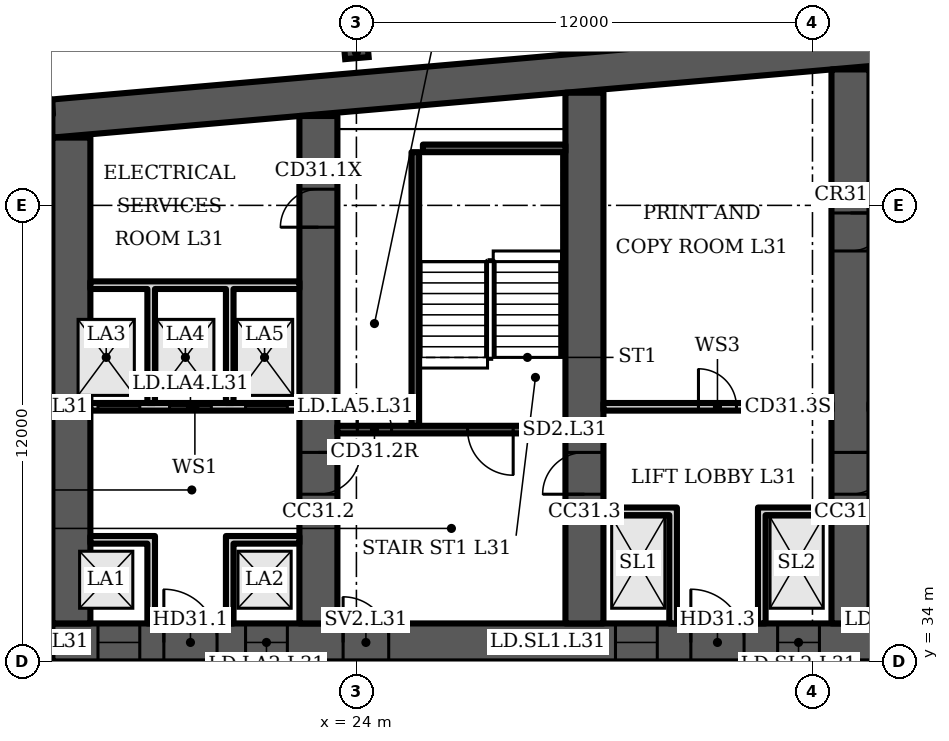
"""IFC4 building model, lengths in metres.
Left out: names, types, materials, properties, quantities, classifications, styles, units other than length and angle.
Written with IfcOpenShell. Run it as: python <this file> out.ifc"""

import sys

from ifc_helpers import new_model, si_unit, direction, frame, frame_2d, origin, origin_2d, place, context, subcontext, project, spatial, polyline, rectangle, i_section, outline, extrude, element, fill, save


model = new_model("IFC4")
c1 = context("Model", 3, precision=1e-05, world=origin(), true_north=direction((0.0, 1.0)))
c2 = subcontext(c1, "Body", "Model", "MODEL_VIEW")
j1 = project(units=[si_unit("LENGTHUNIT", "METRE"), si_unit("PLANEANGLEUNIT", "RADIAN")], contexts=[c1])
p1 = place(None, origin())
s1 = spatial("IfcSite", under=j1, at=p1, CompositionType="ELEMENT")
p2 = place(p1, origin())
s2 = spatial("IfcBuilding", under=s1, at=p2, CompositionType="ELEMENT")
p3 = place(p2, frame((0.0, 0.0, 132.7)))
s3 = spatial("IfcBuildingStorey", under=s2, at=p3, CompositionType="ELEMENT", Elevation=132.7)
p4 = place(p3, origin())
e1 = element("IfcWall", 1, at=p4, inside=s3, PredefinedType="SHEAR", context=c2, shape_type="SweptSolid", body=[
    extrude(outline(polyline([(16.0, 47.784), (40.5, 49.927), (65.0, 47.784), (65.0, 48.787), (40.5, 50.931), (16.0, 48.787), (16.0, 47.784)])), origin(), (0.0, 0.0, 1.0), 3.6),
])
p5 = place(p3, frame((16.0, 34.5, 0.0), z_axis=(0.0, 0.0, 1.0), x_axis=(1.0, 0.0, 0.0)))
e2 = element("IfcWall", 2, at=p5, inside=s3, PredefinedType="SHEAR", context=c2, shape_type="SweptSolid", body=[
    extrude(rectangle(XDim=49.0, YDim=1.0, at=frame_2d((24.5, 0.0))), origin(), (0.0, 0.0, 1.0), 3.6),
])
p6 = place(p5, frame((1.2, 0.0, 0.0)))
e3 = element("IfcOpeningElement", 3, at=p6, cuts=e2, PredefinedType="OPENING", context=c2, shape_type="SweptSolid", body=[
    extrude(rectangle(XDim=1.1, YDim=2.1, at=frame_2d((0.55, 1.05))), frame((0.0, 0.51, 0.0), z_axis=(0.0, -1.0, 0.0), x_axis=(1.0, 0.0, 0.0)), (0.0, 0.0, 1.0), 1.02),
])
p7 = place(p5, frame((5.083, 0.0, 0.0)))
e4 = element("IfcOpeningElement", 4, at=p7, cuts=e2, PredefinedType="OPENING", context=c2, shape_type="SweptSolid", body=[
    extrude(rectangle(XDim=1.1, YDim=2.1, at=frame_2d((0.55, 1.05))), frame((0.0, 0.51, 0.0), z_axis=(0.0, -1.0, 0.0), x_axis=(1.0, 0.0, 0.0)), (0.0, 0.0, 1.0), 1.02),
])
p8 = place(p5, frame((2.933, 0.0, 0.0)))
e5 = element("IfcOpeningElement", 5, at=p8, cuts=e2, PredefinedType="OPENING", context=c2, shape_type="SweptSolid", body=[
    extrude(rectangle(XDim=1.4, YDim=2.1, at=frame_2d((0.7, 1.05))), frame((0.0, 0.51, 0.0), z_axis=(0.0, -1.0, 0.0), x_axis=(1.0, 0.0, 0.0)), (0.0, 0.0, 1.0), 1.02),
])
p9 = place(p5, frame((7.65, 0.0, 0.0)))
e6 = element("IfcOpeningElement", 6, at=p9, cuts=e2, PredefinedType="OPENING", context=c2, shape_type="SweptSolid", body=[
    extrude(rectangle(XDim=1.2, YDim=2.1, at=frame_2d((0.6, 1.05))), frame((0.0, 0.51, 0.0), z_axis=(0.0, -1.0, 0.0), x_axis=(1.0, 0.0, 0.0)), (0.0, 0.0, 1.0), 1.02),
])
p10 = place(p5, frame((14.817, 0.0, 0.0)))
e7 = element("IfcOpeningElement", 7, at=p10, cuts=e2, PredefinedType="OPENING", context=c2, shape_type="SweptSolid", body=[
    extrude(rectangle(XDim=1.1, YDim=2.1, at=frame_2d((0.55, 1.05))), frame((0.0, 0.51, 0.0), z_axis=(0.0, -1.0, 0.0), x_axis=(1.0, 0.0, 0.0)), (0.0, 0.0, 1.0), 1.02),
])
p11 = place(p5, frame((19.083, 0.0, 0.0)))
e8 = element("IfcOpeningElement", 8, at=p11, cuts=e2, PredefinedType="OPENING", context=c2, shape_type="SweptSolid", body=[
    extrude(rectangle(XDim=1.1, YDim=2.1, at=frame_2d((0.55, 1.05))), frame((0.0, 0.51, 0.0), z_axis=(0.0, -1.0, 0.0), x_axis=(1.0, 0.0, 0.0)), (0.0, 0.0, 1.0), 1.02),
])
p12 = place(p5, frame((16.8, 0.0, 0.0)))
e9 = element("IfcOpeningElement", 9, at=p12, cuts=e2, PredefinedType="OPENING", context=c2, shape_type="SweptSolid", body=[
    extrude(rectangle(XDim=1.4, YDim=2.1, at=frame_2d((0.7, 1.05))), frame((0.0, 0.51, 0.0), z_axis=(0.0, -1.0, 0.0), x_axis=(1.0, 0.0, 0.0)), (0.0, 0.0, 1.0), 1.02),
])
p13 = place(p5, frame((21.817, 0.0, 0.0)))
e10 = element("IfcOpeningElement", 10, at=p13, cuts=e2, PredefinedType="OPENING", context=c2, shape_type="SweptSolid", body=[
    extrude(rectangle(XDim=1.1, YDim=2.1, at=frame_2d((0.55, 1.05))), frame((0.0, 0.51, 0.0), z_axis=(0.0, -1.0, 0.0), x_axis=(1.0, 0.0, 0.0)), (0.0, 0.0, 1.0), 1.02),
])
p14 = place(p5, frame((26.083, 0.0, 0.0)))
e11 = element("IfcOpeningElement", 11, at=p14, cuts=e2, PredefinedType="OPENING", context=c2, shape_type="SweptSolid", body=[
    extrude(rectangle(XDim=1.1, YDim=2.1, at=frame_2d((0.55, 1.05))), frame((0.0, 0.51, 0.0), z_axis=(0.0, -1.0, 0.0), x_axis=(1.0, 0.0, 0.0)), (0.0, 0.0, 1.0), 1.02),
])
p15 = place(p5, frame((33.15, 0.0, 0.0)))
e12 = element("IfcOpeningElement", 12, at=p15, cuts=e2, PredefinedType="OPENING", context=c2, shape_type="SweptSolid", body=[
    extrude(rectangle(XDim=1.2, YDim=2.1, at=frame_2d((0.6, 1.05))), frame((0.0, 0.51, 0.0), z_axis=(0.0, -1.0, 0.0), x_axis=(1.0, 0.0, 0.0)), (0.0, 0.0, 1.0), 1.02),
])
p16 = place(p5, frame((37.8, 0.0, 0.0)))
e13 = element("IfcOpeningElement", 13, at=p16, cuts=e2, PredefinedType="OPENING", context=c2, shape_type="SweptSolid", body=[
    extrude(rectangle(XDim=1.4, YDim=2.1, at=frame_2d((0.7, 1.05))), frame((0.0, 0.51, 0.0), z_axis=(0.0, -1.0, 0.0), x_axis=(1.0, 0.0, 0.0)), (0.0, 0.0, 1.0), 1.02),
])
p17 = place(p5, frame((42.817, 0.0, 0.0)))
e14 = element("IfcOpeningElement", 14, at=p17, cuts=e2, PredefinedType="OPENING", context=c2, shape_type="SweptSolid", body=[
    extrude(rectangle(XDim=1.1, YDim=2.1, at=frame_2d((0.55, 1.05))), frame((0.0, 0.51, 0.0), z_axis=(0.0, -1.0, 0.0), x_axis=(1.0, 0.0, 0.0)), (0.0, 0.0, 1.0), 1.02),
])
p18 = place(p5, frame((46.7, 0.0, 0.0)))
e15 = element("IfcOpeningElement", 15, at=p18, cuts=e2, PredefinedType="OPENING", context=c2, shape_type="SweptSolid", body=[
    extrude(rectangle(XDim=1.1, YDim=2.1, at=frame_2d((0.55, 1.05))), frame((0.0, 0.51, 0.0), z_axis=(0.0, -1.0, 0.0), x_axis=(1.0, 0.0, 0.0)), (0.0, 0.0, 1.0), 1.02),
])
p19 = place(p5, frame((44.667, 0.0, 0.0)))
e16 = element("IfcOpeningElement", 16, at=p19, cuts=e2, PredefinedType="OPENING", context=c2, shape_type="SweptSolid", body=[
    extrude(rectangle(XDim=1.4, YDim=2.1, at=frame_2d((0.7, 1.05))), frame((0.0, 0.51, 0.0), z_axis=(0.0, -1.0, 0.0), x_axis=(1.0, 0.0, 0.0)), (0.0, 0.0, 1.0), 1.02),
])
p20 = place(p3, frame((16.5, 35.0, 0.0), z_axis=(0.0, 0.0, 1.0), x_axis=(0.0, 1.0, 0.0)))
e17 = element("IfcWall", 17, at=p20, inside=s3, PredefinedType="SHEAR", context=c2, shape_type="SweptSolid", body=[
    extrude(rectangle(XDim=12.784, YDim=1.0, at=frame_2d((6.392, 0.0))), origin(), (0.0, 0.0, 1.0), 3.6),
])
p21 = place(p3, frame((23.0, 35.0, 0.0), z_axis=(0.0, 0.0, 1.0), x_axis=(0.0, 1.0, 0.0)))
e18 = element("IfcWall", 18, at=p21, inside=s3, PredefinedType="SHEAR", context=c2, shape_type="SweptSolid", body=[
    extrude(rectangle(XDim=13.352, YDim=1.0, at=frame_2d((6.676, 0.0))), origin(), (0.0, 0.0, 1.0), 3.6),
])
p22 = place(p21, frame((10.426, 0.0, 0.0)))
e19 = element("IfcOpeningElement", 19, at=p22, cuts=e18, PredefinedType="OPENING", context=c2, shape_type="SweptSolid", body=[
    extrude(rectangle(XDim=1.0, YDim=2.1, at=frame_2d((0.5, 1.05))), frame((0.0, 0.51, 0.0), z_axis=(0.0, -1.0, 0.0), x_axis=(1.0, 0.0, 0.0)), (0.0, 0.0, 1.0), 1.02),
])
p23 = place(p21, frame((3.4, 0.0, 0.0)))
e20 = element("IfcOpeningElement", 20, at=p23, cuts=e18, PredefinedType="OPENING", context=c2, shape_type="SweptSolid", body=[
    extrude(rectangle(XDim=1.1, YDim=2.1, at=frame_2d((0.55, 1.05))), frame((0.0, 0.51, 0.0), z_axis=(0.0, -1.0, 0.0), x_axis=(1.0, 0.0, 0.0)), (0.0, 0.0, 1.0), 1.02),
])
p24 = place(p3, frame((30.0, 35.0, 0.0), z_axis=(0.0, 0.0, 1.0), x_axis=(0.0, 1.0, 0.0)))
e21 = element("IfcWall", 21, at=p24, inside=s3, PredefinedType="SHEAR", context=c2, shape_type="SweptSolid", body=[
    extrude(rectangle(XDim=13.965, YDim=1.0, at=frame_2d((6.982, 0.0))), origin(), (0.0, 0.0, 1.0), 3.6),
])
p25 = place(p24, frame((3.4, 0.0, 0.0)))
e22 = element("IfcOpeningElement", 22, at=p25, cuts=e21, PredefinedType="OPENING", context=c2, shape_type="SweptSolid", body=[
    extrude(rectangle(XDim=1.1, YDim=2.1, at=frame_2d((0.55, 1.05))), frame((0.0, 0.51, 0.0), z_axis=(0.0, -1.0, 0.0), x_axis=(1.0, 0.0, 0.0)), (0.0, 0.0, 1.0), 1.02),
])
p26 = place(p3, frame((37.0, 35.0, 0.0), z_axis=(0.0, 0.0, 1.0), x_axis=(0.0, 1.0, 0.0)))
e23 = element("IfcWall", 23, at=p26, inside=s3, PredefinedType="SHEAR", context=c2, shape_type="SweptSolid", body=[
    extrude(rectangle(XDim=14.577, YDim=1.0, at=frame_2d((7.289, 0.0))), origin(), (0.0, 0.0, 1.0), 3.6),
])
p27 = place(p26, frame((3.4, 0.0, 0.0)))
e24 = element("IfcOpeningElement", 24, at=p27, cuts=e23, PredefinedType="OPENING", context=c2, shape_type="SweptSolid", body=[
    extrude(rectangle(XDim=1.1, YDim=2.1, at=frame_2d((0.55, 1.05))), frame((0.0, 0.51, 0.0), z_axis=(0.0, -1.0, 0.0), x_axis=(1.0, 0.0, 0.0)), (0.0, 0.0, 1.0), 1.02),
])
p28 = place(p26, frame((9.8, 0.0, 0.0)))
e25 = element("IfcOpeningElement", 25, at=p28, cuts=e23, PredefinedType="OPENING", context=c2, shape_type="SweptSolid", body=[
    extrude(rectangle(XDim=1.0, YDim=2.1, at=frame_2d((0.5, 1.05))), frame((0.0, 0.51, 0.0), z_axis=(0.0, -1.0, 0.0), x_axis=(1.0, 0.0, 0.0)), (0.0, 0.0, 1.0), 1.02),
])
p29 = place(p3, frame((24.0, 50.027, 0.0), z_axis=(0.0, 0.0, 1.0), x_axis=(-0.087156, 0.996198, 0.0)))
e26 = element("IfcColumn", 26, at=p29, inside=s3, PredefinedType="COLUMN", context=c2, shape_type="SweptSolid", body=[
    extrude(i_section(OverallWidth=0.305, OverallDepth=0.62, WebThickness=0.021, FlangeThickness=0.04, FilletRadius=0.027, at=origin_2d()), origin(), (0.0, 0.0, 1.0), 3.6),
])
p30 = place(p3, frame((16.0, 48.587, 0.0), z_axis=(0.0, 0.0, 1.0), x_axis=(-0.996194, -0.087168, 0.0)))
e27 = element("IfcWall", 27, at=p30, inside=s3, PredefinedType="SOLIDWALL", context=c2, shape_type="SweptSolid", body=[
    extrude(rectangle(XDim=2.994, YDim=0.4, at=frame_2d((1.497, 0.0))), origin(), (0.0, 0.0, 1.0), 3.2),
])
p31 = place(p3, frame((17.0, 40.7, 0.0), z_axis=(0.0, 0.0, 1.0), x_axis=(1.0, 0.0, 0.0)))
e28 = element("IfcWall", 28, at=p31, inside=s3, PredefinedType="PARTITIONING", context=c2, shape_type="SweptSolid", body=[
    extrude(rectangle(XDim=5.5, YDim=0.2, at=frame_2d((2.75, 0.0))), origin(), (0.0, 0.0, 1.0), 3.2),
])
p32 = place(p31, frame((0.2, 0.0, 0.0)))
e29 = element("IfcOpeningElement", 29, at=p32, cuts=e28, PredefinedType="OPENING", context=c2, shape_type="SweptSolid", body=[
    extrude(rectangle(XDim=1.1, YDim=2.1, at=frame_2d((0.55, 1.05))), frame((0.0, 0.11, 0.0), z_axis=(0.0, -1.0, 0.0), x_axis=(1.0, 0.0, 0.0)), (0.0, 0.0, 1.0), 0.22),
])
p33 = place(p31, frame((2.083, 0.0, 0.0)))
e30 = element("IfcOpeningElement", 30, at=p33, cuts=e28, PredefinedType="OPENING", context=c2, shape_type="SweptSolid", body=[
    extrude(rectangle(XDim=1.1, YDim=2.1, at=frame_2d((0.55, 1.05))), frame((0.0, 0.11, 0.0), z_axis=(0.0, -1.0, 0.0), x_axis=(1.0, 0.0, 0.0)), (0.0, 0.0, 1.0), 0.22),
])
p34 = place(p31, frame((4.083, 0.0, 0.0)))
e31 = element("IfcOpeningElement", 31, at=p34, cuts=e28, PredefinedType="OPENING", context=c2, shape_type="SweptSolid", body=[
    extrude(rectangle(XDim=1.1, YDim=2.1, at=frame_2d((0.55, 1.05))), frame((0.0, 0.11, 0.0), z_axis=(0.0, -1.0, 0.0), x_axis=(1.0, 0.0, 0.0)), (0.0, 0.0, 1.0), 0.22),
])
p35 = place(p3, frame((0.0, 0.0, -0.0)))
e32 = element("IfcWall", 32, at=p35, inside=s3, PredefinedType="PARTITIONING", context=c2, shape_type="SweptSolid", body=[
    extrude(outline(polyline([(18.5, 37.1), (17.0, 37.1), (17.0, 37.3), (18.5, 37.3), (18.7, 37.3), (18.7, 35.0), (18.5, 35.0), (18.5, 37.1)])), origin(), (0.0, 0.0, 1.0), 3.2),
])
p36 = place(p3, frame((0.0, 0.0, -0.0)))
e33 = element("IfcWall", 33, at=p36, inside=s3, PredefinedType="PARTITIONING", context=c2, shape_type="SweptSolid", body=[
    extrude(outline(polyline([(20.567, 37.3), (20.767, 37.3), (22.5, 37.3), (22.5, 37.1), (20.767, 37.1), (20.767, 35.0), (20.567, 35.0), (20.567, 37.3)])), origin(), (0.0, 0.0, 1.0), 3.2),
])
p37 = place(p3, frame((0.0, 0.0, -0.0)))
e34 = element("IfcWall", 34, at=p37, inside=s3, PredefinedType="PARTITIONING", context=c2, shape_type="SweptSolid", body=[
    extrude(outline(polyline([(18.7, 40.8), (18.5, 40.8), (18.5, 43.8), (17.0, 43.8), (17.0, 44.0), (22.5, 44.0), (22.5, 43.8), (20.767, 43.8), (20.767, 40.8), (20.567, 40.8), (20.567, 43.8), (18.7, 43.8), (18.7, 40.8)])), origin(), (0.0, 0.0, 1.0), 3.2),
])
p38 = place(p3, frame((23.5, 40.1, 0.0), z_axis=(0.0, 0.0, 1.0), x_axis=(1.0, 0.0, 0.0)))
e35 = element("IfcWall", 35, at=p38, inside=s3, PredefinedType="SHEAR", context=c2, shape_type="SweptSolid", body=[
    extrude(rectangle(XDim=6.0, YDim=0.2, at=frame_2d((3.0, 0.0))), origin(), (0.0, 0.0, 1.0), 3.2),
])
p39 = place(p38, frame((3.425, 0.0, 0.0)))
e36 = element("IfcOpeningElement", 36, at=p39, cuts=e35, PredefinedType="OPENING", context=c2, shape_type="SweptSolid", body=[
    extrude(rectangle(XDim=1.2, YDim=2.1, at=frame_2d((0.6, 1.05))), frame((0.0, 0.11, 0.0), z_axis=(0.0, -1.0, 0.0), x_axis=(1.0, 0.0, 0.0)), (0.0, 0.0, 1.0), 0.22),
])
p40 = place(p38, frame((0.525, 0.0, 0.0)))
e37 = element("IfcOpeningElement", 37, at=p40, cuts=e35, PredefinedType="OPENING", context=c2, shape_type="SweptSolid", body=[
    extrude(rectangle(XDim=0.9, YDim=2.1, at=frame_2d((0.45, 1.05))), frame((0.0, 0.11, 0.0), z_axis=(0.0, -1.0, 0.0), x_axis=(1.0, 0.0, 0.0)), (0.0, 0.0, 1.0), 0.22),
])
p41 = place(p3, frame((25.55, 40.2, 0.0), z_axis=(0.0, 0.0, 1.0), x_axis=(0.0, 1.0, 0.0)))
e38 = element("IfcWall", 38, at=p41, inside=s3, PredefinedType="SHEAR", context=c2, shape_type="SweptSolid", body=[
    extrude(rectangle(XDim=7.2, YDim=0.2, at=frame_2d((3.6, 0.0))), origin(), (0.0, 0.0, 1.0), 3.2),
])
p42 = place(p3, frame((25.75, 47.5, 0.0), z_axis=(0.0, 0.0, 1.0), x_axis=(1.0, 0.0, 0.0)))
e39 = element("IfcWall", 39, at=p42, inside=s3, PredefinedType="SHEAR", context=c2, shape_type="SweptSolid", body=[
    extrude(rectangle(XDim=3.75, YDim=0.2, at=frame_2d((1.875, 0.0))), origin(), (0.0, 0.0, 1.0), 3.2),
])
p43 = place(p3, frame((30.5, 40.7, 0.0), z_axis=(0.0, 0.0, 1.0), x_axis=(1.0, 0.0, 0.0)))
e40 = element("IfcWall", 40, at=p43, inside=s3, PredefinedType="PARTITIONING", context=c2, shape_type="SweptSolid", body=[
    extrude(rectangle(XDim=6.0, YDim=0.2, at=frame_2d((3.0, 0.0))), origin(), (0.0, 0.0, 1.0), 3.2),
])
p44 = place(p43, frame((2.5, 0.0, 0.0)))
e41 = element("IfcOpeningElement", 41, at=p44, cuts=e40, PredefinedType="OPENING", context=c2, shape_type="SweptSolid", body=[
    extrude(rectangle(XDim=1.0, YDim=2.1, at=frame_2d((0.5, 1.05))), frame((0.0, 0.11, 0.0), z_axis=(0.0, -1.0, 0.0), x_axis=(1.0, 0.0, 0.0)), (0.0, 0.0, 1.0), 0.22),
])
p45 = place(p3, frame((0.0, 0.0, -0.0)))
e42 = element("IfcWall", 42, at=p45, inside=s3, PredefinedType="PARTITIONING", context=c2, shape_type="SweptSolid", body=[
    extrude(outline(polyline([(32.233, 37.85), (30.5, 37.85), (30.5, 38.05), (32.233, 38.05), (32.433, 38.05), (32.433, 35.0), (32.233, 35.0), (32.233, 37.85)])), origin(), (0.0, 0.0, 1.0), 3.2),
])
p46 = place(p3, frame((0.0, 0.0, -0.0)))
e43 = element("IfcWall", 43, at=p46, inside=s3, PredefinedType="PARTITIONING", context=c2, shape_type="SweptSolid", body=[
    extrude(outline(polyline([(34.567, 38.05), (34.767, 38.05), (36.5, 38.05), (36.5, 37.85), (34.767, 37.85), (34.767, 35.0), (34.567, 35.0), (34.567, 38.05)])), origin(), (0.0, 0.0, 1.0), 3.2),
])
p47 = place(p6, origin())
e44 = element("IfcDoor", 44, at=p47, inside=s3, OperationType="DOUBLE_DOOR_SLIDING", PredefinedType="DOOR", context=c2, shape_type="SweptSolid", body=[
    extrude(rectangle(XDim=1.1, YDim=2.1, at=frame_2d((0.55, 1.05))), frame((0.0, 0.025, 0.0), z_axis=(0.0, -1.0, 0.0), x_axis=(1.0, 0.0, 0.0)), (0.0, 0.0, 1.0), 0.05),
])
fill(e3, e44)
p48 = place(p7, origin())
e45 = element("IfcDoor", 45, at=p48, inside=s3, OperationType="DOUBLE_DOOR_SLIDING", PredefinedType="DOOR", context=c2, shape_type="SweptSolid", body=[
    extrude(rectangle(XDim=1.1, YDim=2.1, at=frame_2d((0.55, 1.05))), frame((0.0, 0.025, 0.0), z_axis=(0.0, -1.0, 0.0), x_axis=(1.0, 0.0, 0.0)), (0.0, 0.0, 1.0), 0.05),
])
fill(e4, e45)
p49 = place(p8, origin())
e46 = element("IfcDoor", 46, at=p49, inside=s3, OperationType="DOUBLE_DOOR_SINGLE_SWING", PredefinedType="DOOR", context=c2, shape_type="SweptSolid", body=[
    extrude(rectangle(XDim=1.4, YDim=2.1, at=frame_2d((0.7, 1.05))), frame((0.0, 0.025, 0.0), z_axis=(0.0, -1.0, 0.0), x_axis=(1.0, 0.0, 0.0)), (0.0, 0.0, 1.0), 0.05),
])
fill(e5, e46)
p50 = place(p32, origin())
e47 = element("IfcDoor", 47, at=p50, inside=s3, OperationType="DOUBLE_DOOR_SLIDING", PredefinedType="DOOR", context=c2, shape_type="SweptSolid", body=[
    extrude(rectangle(XDim=1.1, YDim=2.1, at=frame_2d((0.55, 1.05))), frame((0.0, 0.025, 0.0), z_axis=(0.0, -1.0, 0.0), x_axis=(1.0, 0.0, 0.0)), (0.0, 0.0, 1.0), 0.05),
])
fill(e29, e47)
p51 = place(p33, origin())
e48 = element("IfcDoor", 48, at=p51, inside=s3, OperationType="DOUBLE_DOOR_SLIDING", PredefinedType="DOOR", context=c2, shape_type="SweptSolid", body=[
    extrude(rectangle(XDim=1.1, YDim=2.1, at=frame_2d((0.55, 1.05))), frame((0.0, 0.025, 0.0), z_axis=(0.0, -1.0, 0.0), x_axis=(1.0, 0.0, 0.0)), (0.0, 0.0, 1.0), 0.05),
])
fill(e30, e48)
p52 = place(p34, origin())
e49 = element("IfcDoor", 49, at=p52, inside=s3, OperationType="DOUBLE_DOOR_SLIDING", PredefinedType="DOOR", context=c2, shape_type="SweptSolid", body=[
    extrude(rectangle(XDim=1.1, YDim=2.1, at=frame_2d((0.55, 1.05))), frame((0.0, 0.025, 0.0), z_axis=(0.0, -1.0, 0.0), x_axis=(1.0, 0.0, 0.0)), (0.0, 0.0, 1.0), 0.05),
])
fill(e31, e49)
p53 = place(p22, origin())
e50 = element("IfcDoor", 50, at=p53, inside=s3, OperationType="SINGLE_SWING_LEFT", PredefinedType="DOOR", context=c2, shape_type="SweptSolid", body=[
    extrude(rectangle(XDim=1.0, YDim=2.1, at=frame_2d((0.5, 1.05))), frame((0.0, 0.5, 0.0), z_axis=(0.0, -1.0, 0.0), x_axis=(1.0, 0.0, 0.0)), (0.0, 0.0, 1.0), 1.0),
])
fill(e19, e50)
p54 = place(p39, origin())
e51 = element("IfcDoor", 51, at=p54, inside=s3, OperationType="SINGLE_SWING_RIGHT", PredefinedType="DOOR", context=c2, shape_type="SweptSolid", body=[
    extrude(rectangle(XDim=1.2, YDim=2.1, at=frame_2d((0.6, 1.05))), frame((0.0, 0.025, 0.0), z_axis=(0.0, -1.0, 0.0), x_axis=(1.0, 0.0, 0.0)), (0.0, 0.0, 1.0), 0.05),
])
fill(e36, e51)
p55 = place(p40, origin())
e52 = element("IfcDoor", 52, at=p55, inside=s3, OperationType="SINGLE_SWING_LEFT", PredefinedType="DOOR", context=c2, shape_type="SweptSolid", body=[
    extrude(rectangle(XDim=0.9, YDim=2.1, at=frame_2d((0.45, 1.05))), frame((0.0, 0.025, 0.0), z_axis=(0.0, -1.0, 0.0), x_axis=(1.0, 0.0, 0.0)), (0.0, 0.0, 1.0), 0.05),
])
fill(e37, e52)
p56 = place(p9, origin())
e53 = element("IfcDoor", 53, at=p56, inside=s3, OperationType="SINGLE_SWING_LEFT", PredefinedType="DOOR", context=c2, shape_type="SweptSolid", body=[
    extrude(rectangle(XDim=1.2, YDim=2.1, at=frame_2d((0.6, 1.05))), frame((0.0, 0.025, 0.0), z_axis=(0.0, -1.0, 0.0), x_axis=(1.0, 0.0, 0.0)), (0.0, 0.0, 1.0), 0.05),
])
fill(e6, e53)
p57 = place(p10, origin())
e54 = element("IfcDoor", 54, at=p57, inside=s3, OperationType="DOUBLE_DOOR_SLIDING", PredefinedType="DOOR", context=c2, shape_type="SweptSolid", body=[
    extrude(rectangle(XDim=1.1, YDim=2.1, at=frame_2d((0.55, 1.05))), frame((0.0, 0.025, 0.0), z_axis=(0.0, -1.0, 0.0), x_axis=(1.0, 0.0, 0.0)), (0.0, 0.0, 1.0), 0.05),
])
fill(e7, e54)
p58 = place(p11, origin())
e55 = element("IfcDoor", 55, at=p58, inside=s3, OperationType="DOUBLE_DOOR_SLIDING", PredefinedType="DOOR", context=c2, shape_type="SweptSolid", body=[
    extrude(rectangle(XDim=1.1, YDim=2.1, at=frame_2d((0.55, 1.05))), frame((0.0, 0.025, 0.0), z_axis=(0.0, -1.0, 0.0), x_axis=(1.0, 0.0, 0.0)), (0.0, 0.0, 1.0), 0.05),
])
fill(e8, e55)
p59 = place(p12, origin())
e56 = element("IfcDoor", 56, at=p59, inside=s3, OperationType="DOUBLE_DOOR_SINGLE_SWING", PredefinedType="DOOR", context=c2, shape_type="SweptSolid", body=[
    extrude(rectangle(XDim=1.4, YDim=2.1, at=frame_2d((0.7, 1.05))), frame((0.0, 0.025, 0.0), z_axis=(0.0, -1.0, 0.0), x_axis=(1.0, 0.0, 0.0)), (0.0, 0.0, 1.0), 0.05),
])
fill(e9, e56)
p60 = place(p44, origin())
e57 = element("IfcDoor", 57, at=p60, inside=s3, OperationType="SINGLE_SWING_LEFT", PredefinedType="DOOR", context=c2, shape_type="SweptSolid", body=[
    extrude(rectangle(XDim=1.0, YDim=2.1, at=frame_2d((0.5, 1.05))), frame((0.0, 0.025, 0.0), z_axis=(0.0, -1.0, 0.0), x_axis=(1.0, 0.0, 0.0)), (0.0, 0.0, 1.0), 0.05),
])
fill(e41, e57)
p61 = place(p23, origin())
e58 = element("IfcDoor", 58, at=p61, inside=s3, OperationType="SINGLE_SWING_RIGHT", PredefinedType="DOOR", context=c2, shape_type="SweptSolid", body=[
    extrude(rectangle(XDim=1.1, YDim=2.1, at=frame_2d((0.55, 1.05))), frame((0.0, 0.025, 0.0), z_axis=(0.0, -1.0, 0.0), x_axis=(1.0, 0.0, 0.0)), (0.0, 0.0, 1.0), 0.05),
])
fill(e20, e58)
p62 = place(p25, origin())
e59 = element("IfcDoor", 59, at=p62, inside=s3, OperationType="SINGLE_SWING_LEFT", PredefinedType="DOOR", context=c2, shape_type="SweptSolid", body=[
    extrude(rectangle(XDim=1.1, YDim=2.1, at=frame_2d((0.55, 1.05))), frame((0.0, 0.025, 0.0), z_axis=(0.0, -1.0, 0.0), x_axis=(1.0, 0.0, 0.0)), (0.0, 0.0, 1.0), 0.05),
])
fill(e22, e59)
p63 = place(p27, origin())
e60 = element("IfcDoor", 60, at=p63, inside=s3, OperationType="SINGLE_SWING_RIGHT", PredefinedType="DOOR", context=c2, shape_type="SweptSolid", body=[
    extrude(rectangle(XDim=1.1, YDim=2.1, at=frame_2d((0.55, 1.05))), frame((0.0, 0.025, 0.0), z_axis=(0.0, -1.0, 0.0), x_axis=(1.0, 0.0, 0.0)), (0.0, 0.0, 1.0), 0.05),
])
fill(e24, e60)
p64 = place(p28, origin())
e61 = element("IfcDoor", 61, at=p64, inside=s3, OperationType="SINGLE_SWING_RIGHT", PredefinedType="DOOR", context=c2, shape_type="SweptSolid", body=[
    extrude(rectangle(XDim=1.0, YDim=2.1, at=frame_2d((0.5, 1.05))), frame((0.0, 0.5, 0.0), z_axis=(0.0, -1.0, 0.0), x_axis=(1.0, 0.0, 0.0)), (0.0, 0.0, 1.0), 1.0),
])
fill(e25, e61)
save(model, sys.argv[1])
